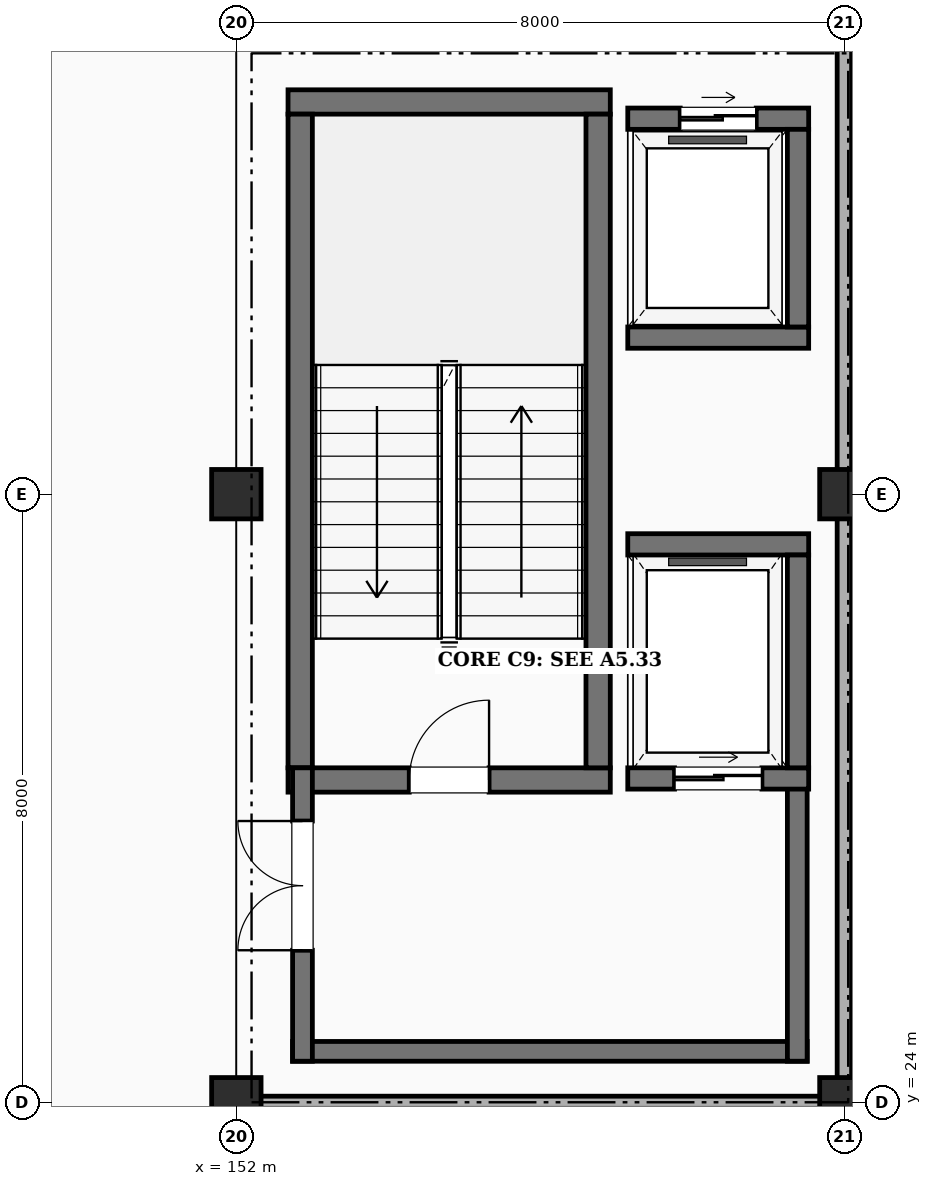
"""IFC4 building model, lengths in metres.
Left out: names, types, materials, properties, quantities, classifications, styles, units other than length and angle.
Written with IfcOpenShell. Run it as: python <this file> out.ifc"""

import sys

from ifc_helpers import new_model, si_unit, direction, frame, frame_2d, origin, origin_2d, place, context, subcontext, project, spatial, rectangle, extrude, element, fill, save


model = new_model("IFC4")
c1 = context("Model", 3, precision=1e-05, world=origin(), true_north=direction((0.0, 1.0)))
c2 = subcontext(c1, "Body", "Model", "MODEL_VIEW")
j1 = project(units=[si_unit("LENGTHUNIT", "METRE"), si_unit("PLANEANGLEUNIT", "RADIAN")], contexts=[c1])
p1 = place(None, origin())
s1 = spatial("IfcSite", under=j1, at=p1, CompositionType="ELEMENT")
p2 = place(p1, origin())
s2 = spatial("IfcBuilding", under=s1, at=p2, CompositionType="ELEMENT")
p3 = place(p2, frame((0.0, 0.0, 15.0)))
s3 = spatial("IfcBuildingStorey", under=s2, at=p3, CompositionType="ELEMENT", Elevation=15.0)
for number, where, z_axis, x_axis in (
    (1, (152.0, 24.0, 0.0), (0.0, 0.0, 1.0), (1.0, 0.0, 0.0)),
    (2, (152.0, 32.0, 0.0), (0.0, 0.0, 1.0), (1.0, 0.0, 0.0)),
    (3, (160.0, 24.0, 0.0), (0.0, 0.0, 1.0), (1.0, 0.0, 0.0)),
    (4, (160.0, 32.0, 0.0), (0.0, 0.0, 1.0), (1.0, 0.0, 0.0)),
):
    element("IfcColumn", number, at=place(p3, frame(where, z_axis=z_axis, x_axis=x_axis)), inside=s3, PredefinedType="COLUMN", context=c2, shape_type="SweptSolid", body=[
        extrude(rectangle(XDim=0.65, YDim=0.65, at=origin_2d()), origin(), (0.0, 0.0, 1.0), 4.2),
    ])
p4 = place(p3, frame((152.68, 28.24, 0.0), z_axis=(0.0, 0.0, 1.0), x_axis=(1.0, 0.0, 0.0)))
e5 = element("IfcWall", 5, at=p4, inside=s3, PredefinedType="SHEAR", context=c2, shape_type="SweptSolid", body=[
    extrude(rectangle(XDim=4.24, YDim=0.32, at=frame_2d((2.12, 0.0))), origin(), (0.0, 0.0, 1.0), 4.2),
])
p5 = place(p4, frame((1.595, 0.0, 0.0)))
e6 = element("IfcOpeningElement", 6, at=p5, cuts=e5, PredefinedType="OPENING", context=c2, shape_type="SweptSolid", body=[
    extrude(rectangle(XDim=1.05, YDim=2.15, at=frame_2d((0.525, 1.075))), frame((0.0, 0.17, 0.0), z_axis=(0.0, -1.0, 0.0), x_axis=(1.0, 0.0, 0.0)), (0.0, 0.0, 1.0), 0.34),
])
p6 = place(p3, frame((152.68, 37.16, 0.0), z_axis=(0.0, 0.0, 1.0), x_axis=(1.0, 0.0, 0.0)))
e7 = element("IfcWall", 7, at=p6, inside=s3, PredefinedType="SHEAR", context=c2, shape_type="SweptSolid", body=[
    extrude(rectangle(XDim=4.24, YDim=0.32, at=frame_2d((2.12, 0.0))), origin(), (0.0, 0.0, 1.0), 4.2),
])
for number, where, z_axis, x_axis in (
    (8, (152.84, 28.4, 0.0), (0.0, 0.0, 1.0), (0.0, 1.0, 0.0)),
    (9, (156.76, 28.4, 0.0), (0.0, 0.0, 1.0), (0.0, 1.0, 0.0)),
):
    element("IfcWall", number, at=place(p3, frame(where, z_axis=z_axis, x_axis=x_axis)), inside=s3, PredefinedType="SHEAR", context=c2, shape_type="SweptSolid", body=[
        extrude(rectangle(XDim=8.6, YDim=0.32, at=frame_2d((4.3, 0.0))), origin(), (0.0, 0.0, 1.0), 4.2),
    ])
p7 = place(p3, frame((159.51, 24.67, 0.0), z_axis=(0.0, 0.0, 1.0), x_axis=(-1.0, 0.0, 0.0)))
e10 = element("IfcWall", 10, at=p7, inside=s3, PredefinedType="SHEAR", context=c2, shape_type="SweptSolid", body=[
    extrude(rectangle(XDim=6.77, YDim=0.26, at=frame_2d((3.385, 0.0))), origin(), (0.0, 0.0, 1.0), 4.2),
])
p8 = place(p3, frame((152.87, 24.54, 0.0), z_axis=(0.0, 0.0, 1.0), x_axis=(0.0, 1.0, 0.0)))
e11 = element("IfcWall", 11, at=p8, inside=s3, PredefinedType="SHEAR", context=c2, shape_type="SweptSolid", body=[
    extrude(rectangle(XDim=3.86, YDim=0.26, at=frame_2d((1.93, 0.0))), origin(), (0.0, 0.0, 1.0), 4.2),
])
p9 = place(p8, frame((1.46, 0.0, 0.0)))
e12 = element("IfcOpeningElement", 12, at=p9, cuts=e11, PredefinedType="OPENING", context=c2, shape_type="SweptSolid", body=[
    extrude(rectangle(XDim=1.7, YDim=2.2, at=frame_2d((0.85, 1.1))), frame((0.0, 0.14, 0.0), z_axis=(0.0, -1.0, 0.0), x_axis=(1.0, 0.0, 0.0)), (0.0, 0.0, 1.0), 0.28),
])
p10 = place(p3, frame((159.38, 24.54, 0.0), z_axis=(0.0, 0.0, 1.0), x_axis=(0.0, 1.0, 0.0)))
e13 = element("IfcWall", 13, at=p10, inside=s3, PredefinedType="SHEAR", context=c2, shape_type="SweptSolid", body=[
    extrude(rectangle(XDim=3.86, YDim=0.26, at=frame_2d((1.93, 0.0))), origin(), (0.0, 0.0, 1.0), 4.2),
])
p11 = place(p3, frame((157.15, 28.26, 0.0), z_axis=(0.0, 0.0, 1.0), x_axis=(1.0, 0.0, 0.0)))
e14 = element("IfcWall", 14, at=p11, inside=s3, PredefinedType="SHEAR", context=c2, shape_type="SweptSolid", body=[
    extrude(rectangle(XDim=2.38, YDim=0.28, at=frame_2d((1.19, 0.0))), origin(), (0.0, 0.0, 1.0), 4.2),
])
p12 = place(p11, frame((0.615, 0.0, 0.0)))
e15 = element("IfcOpeningElement", 15, at=p12, cuts=e14, PredefinedType="OPENING", context=c2, shape_type="SweptSolid", body=[
    extrude(rectangle(XDim=1.15, YDim=2.2, at=frame_2d((0.575, 1.1))), frame((0.0, 0.15, 0.0), z_axis=(0.0, -1.0, 0.0), x_axis=(1.0, 0.0, 0.0)), (0.0, 0.0, 1.0), 0.3),
])
p13 = place(p3, frame((157.15, 31.34, 0.0), z_axis=(0.0, 0.0, 1.0), x_axis=(1.0, 0.0, 0.0)))
e16 = element("IfcWall", 16, at=p13, inside=s3, PredefinedType="SHEAR", context=c2, shape_type="SweptSolid", body=[
    extrude(rectangle(XDim=2.38, YDim=0.28, at=frame_2d((1.19, 0.0))), origin(), (0.0, 0.0, 1.0), 4.2),
])
p14 = place(p3, frame((159.39, 28.4, 0.0), z_axis=(0.0, 0.0, 1.0), x_axis=(0.0, 1.0, 0.0)))
e17 = element("IfcWall", 17, at=p14, inside=s3, PredefinedType="SHEAR", context=c2, shape_type="SweptSolid", body=[
    extrude(rectangle(XDim=2.8, YDim=0.28, at=frame_2d((1.4, 0.0))), origin(), (0.0, 0.0, 1.0), 4.2),
])
p15 = place(p3, frame((157.15, 34.06, 0.0), z_axis=(0.0, 0.0, 1.0), x_axis=(1.0, 0.0, 0.0)))
e18 = element("IfcWall", 18, at=p15, inside=s3, PredefinedType="SHEAR", context=c2, shape_type="SweptSolid", body=[
    extrude(rectangle(XDim=2.38, YDim=0.28, at=frame_2d((1.19, 0.0))), origin(), (0.0, 0.0, 1.0), 4.2),
])
p16 = place(p3, frame((157.15, 36.94, 0.0), z_axis=(0.0, 0.0, 1.0), x_axis=(1.0, 0.0, 0.0)))
e19 = element("IfcWall", 19, at=p16, inside=s3, PredefinedType="SHEAR", context=c2, shape_type="SweptSolid", body=[
    extrude(rectangle(XDim=2.38, YDim=0.28, at=frame_2d((1.19, 0.0))), origin(), (0.0, 0.0, 1.0), 4.2),
])
p17 = place(p16, frame((0.69, 0.0, 0.0)))
e20 = element("IfcOpeningElement", 20, at=p17, cuts=e19, PredefinedType="OPENING", context=c2, shape_type="SweptSolid", body=[
    extrude(rectangle(XDim=1.0, YDim=2.15, at=frame_2d((0.5, 1.075))), frame((0.0, 0.15, 0.0), z_axis=(0.0, -1.0, 0.0), x_axis=(1.0, 0.0, 0.0)), (0.0, 0.0, 1.0), 0.3),
])
p18 = place(p3, frame((159.39, 34.2, 0.0), z_axis=(0.0, 0.0, 1.0), x_axis=(0.0, 1.0, 0.0)))
e21 = element("IfcWall", 21, at=p18, inside=s3, PredefinedType="SHEAR", context=c2, shape_type="SweptSolid", body=[
    extrude(rectangle(XDim=2.6, YDim=0.28, at=frame_2d((1.3, 0.0))), origin(), (0.0, 0.0, 1.0), 4.2),
])
p19 = place(p3, frame((152.22, 24.0, 0.0), z_axis=(0.0, 0.0, 1.0), x_axis=(1.0, 0.0, 0.0)))
e22 = element("IfcWall", 22, at=p19, inside=s3, PredefinedType="PARTITIONING", context=c2, shape_type="SweptSolid", body=[
    extrude(rectangle(XDim=23.66, YDim=0.16, at=frame_2d((11.83, 0.0))), origin(), (0.0, 0.0, 1.0), 3.31),
])
p20 = place(p19, frame((11.29, 0.0, 0.0)))
e23 = element("IfcOpeningElement", 23, at=p20, cuts=e22, PredefinedType="OPENING", context=c2, shape_type="SweptSolid", body=[
    extrude(rectangle(XDim=1.08, YDim=2.15, at=frame_2d((0.54, 1.075))), frame((0.0, 0.09, 0.0), z_axis=(0.0, -1.0, 0.0), x_axis=(1.0, 0.0, 0.0)), (0.0, 0.0, 1.0), 0.18),
])
p21 = place(p3, frame((160.0, 24.02, 0.0), z_axis=(0.0, 0.0, 1.0), x_axis=(0.0, 1.0, 0.0)))
e24 = element("IfcWall", 24, at=p21, inside=s3, PredefinedType="SOLIDWALL", context=c2, shape_type="SweptSolid", body=[
    extrude(rectangle(XDim=19.16, YDim=0.19, at=frame_2d((9.58, 0.0))), origin(), (0.0, 0.0, 1.0), 3.31),
])
p22 = place(p5, origin())
e25 = element("IfcDoor", 25, at=p22, inside=s3, OperationType="SINGLE_SWING_RIGHT", PredefinedType="DOOR", context=c2, shape_type="SweptSolid", body=[
    extrude(rectangle(XDim=1.05, YDim=2.15, at=frame_2d((0.525, 1.075))), frame((0.0, 0.025, 0.0), z_axis=(0.0, -1.0, 0.0), x_axis=(1.0, 0.0, 0.0)), (0.0, 0.0, 1.0), 0.05),
])
fill(e6, e25)
p23 = place(p9, origin())
e26 = element("IfcDoor", 26, at=p23, inside=s3, OperationType="DOUBLE_DOOR_SINGLE_SWING", PredefinedType="DOOR", context=c2, shape_type="SweptSolid", body=[
    extrude(rectangle(XDim=1.7, YDim=2.2, at=frame_2d((0.85, 1.1))), frame((0.0, 0.025, 0.0), z_axis=(0.0, -1.0, 0.0), x_axis=(1.0, 0.0, 0.0)), (0.0, 0.0, 1.0), 0.05),
])
fill(e12, e26)
p24 = place(p12, origin())
e27 = element("IfcDoor", 27, at=p24, inside=s3, OperationType="SLIDING_TO_LEFT", PredefinedType="DOOR", context=c2, shape_type="SweptSolid", body=[
    extrude(rectangle(XDim=1.15, YDim=2.2, at=frame_2d((0.575, 1.1))), frame((0.0, 0.025, 0.0), z_axis=(0.0, -1.0, 0.0), x_axis=(1.0, 0.0, 0.0)), (0.0, 0.0, 1.0), 0.05),
])
fill(e15, e27)
p25 = place(p17, origin())
e28 = element("IfcDoor", 28, at=p25, inside=s3, OperationType="SLIDING_TO_LEFT", PredefinedType="DOOR", context=c2, shape_type="SweptSolid", body=[
    extrude(rectangle(XDim=1.0, YDim=2.15, at=frame_2d((0.5, 1.075))), frame((0.0, 0.025, 0.0), z_axis=(0.0, -1.0, 0.0), x_axis=(1.0, 0.0, 0.0)), (0.0, 0.0, 1.0), 0.05),
])
fill(e20, e28)
save(model, sys.argv[1])
